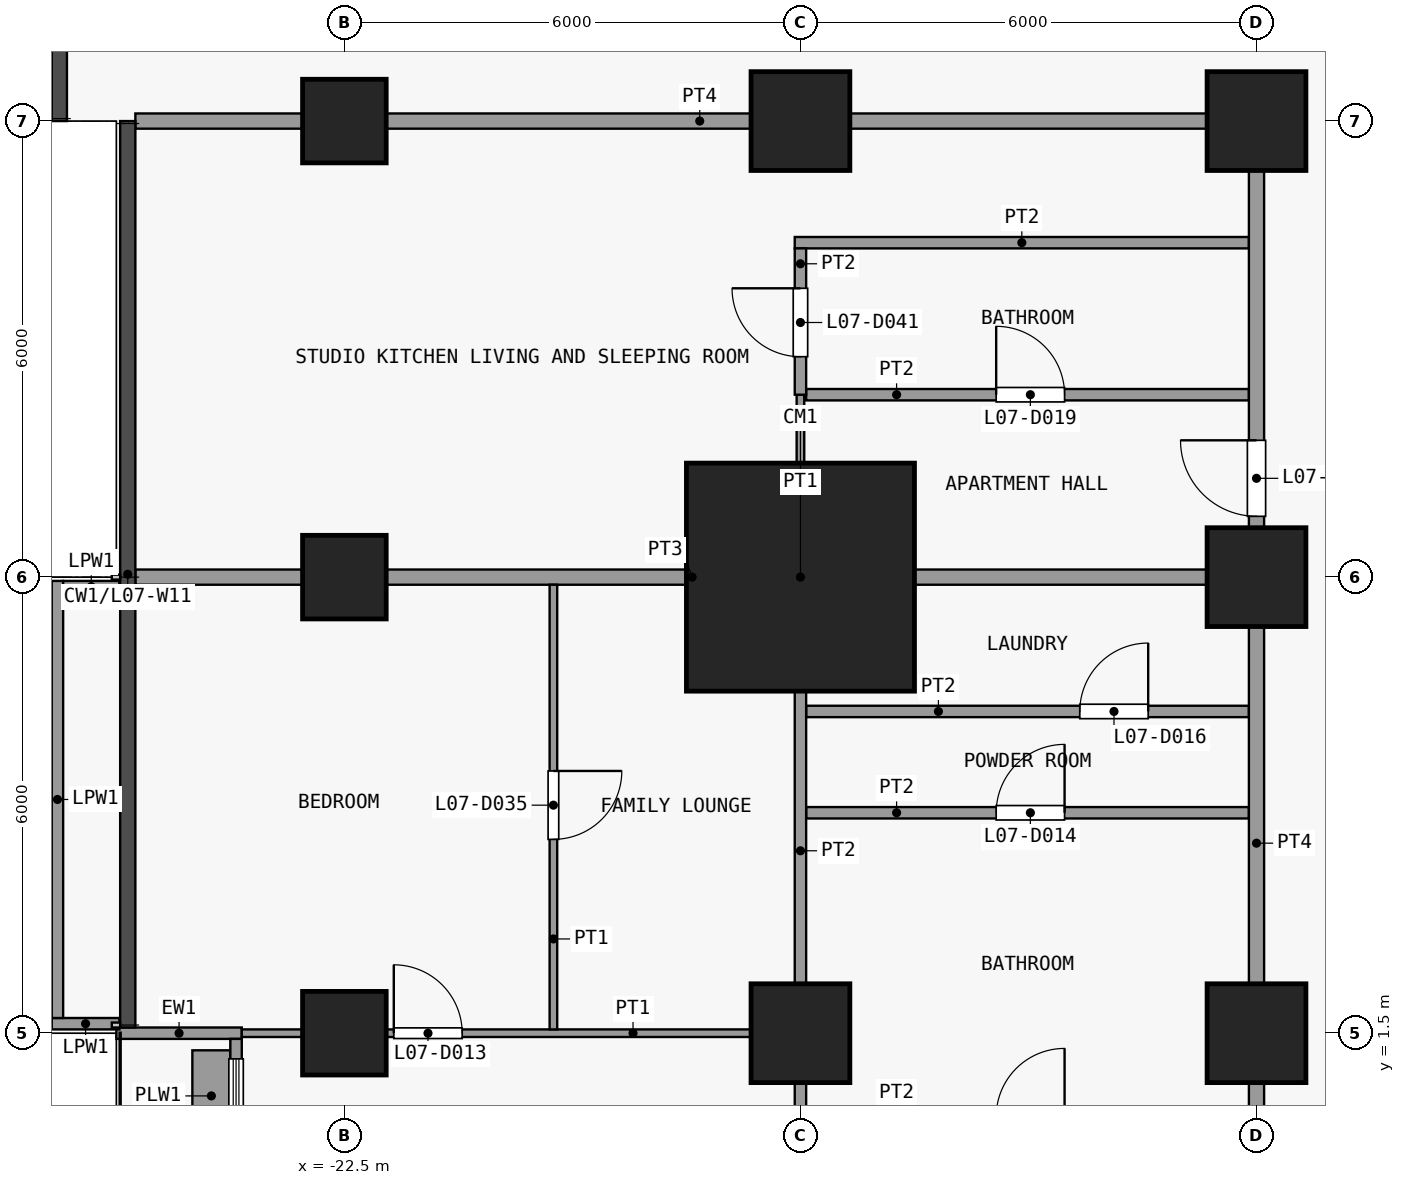
"""IFC4 building model, lengths in metres.
Left out: names, types, materials, properties, quantities, classifications, styles, units other than length and angle.
Written with IfcOpenShell. Run it as: python <this file> out.ifc"""

import sys

from ifc_helpers import new_model, si_unit, direction, frame, frame_2d, origin, origin_2d, place, context, subcontext, project, spatial, rectangle, extrude, element, fill, save


model = new_model("IFC4")
c1 = context("Model", 3, precision=1e-05, world=origin(), true_north=direction((0.0, 1.0)))
c2 = subcontext(c1, "Body", "Model", "MODEL_VIEW")
j1 = project(units=[si_unit("LENGTHUNIT", "METRE"), si_unit("PLANEANGLEUNIT", "RADIAN")], contexts=[c1])
p1 = place(None, origin())
s1 = spatial("IfcSite", under=j1, at=p1, CompositionType="ELEMENT")
p2 = place(p1, origin())
s2 = spatial("IfcBuilding", under=s1, at=p2, CompositionType="ELEMENT")
p3 = place(p2, frame((0.0, 0.0, 36.1)))
s3 = spatial("IfcBuildingStorey", under=s2, at=p3, CompositionType="ELEMENT", Elevation=36.1)
for number, where, z_axis, x_axis in (
    (1, (-22.5, 1.5, 0.0), (0.0, 0.0, 1.0), (1.0, 0.0, 0.0)),
    (2, (-22.5, 7.5, 0.0), (0.0, 0.0, 1.0), (1.0, 0.0, 0.0)),
    (3, (-22.5, 13.5, 0.0), (0.0, 0.0, 1.0), (1.0, 0.0, 0.0)),
):
    element("IfcColumn", number, at=place(p3, frame(where, z_axis=z_axis, x_axis=x_axis)), inside=s3, PredefinedType="COLUMN", context=c2, shape_type="SweptSolid", body=[
        extrude(rectangle(XDim=1.1, YDim=1.1, at=origin_2d()), origin(), (0.0, 0.0, 1.0), 3.6),
    ])
p4 = place(p3, frame((-16.5, 1.5, 0.0), z_axis=(0.0, 0.0, 1.0), x_axis=(1.0, 0.0, 0.0)))
e4 = element("IfcColumn", 4, at=p4, inside=s3, PredefinedType="COLUMN", context=c2, shape_type="SweptSolid", body=[
    extrude(rectangle(XDim=1.3, YDim=1.3, at=origin_2d()), origin(), (0.0, 0.0, 1.0), 3.6),
])
p5 = place(p3, frame((-16.5, 7.5, 0.0), z_axis=(0.0, 0.0, 1.0), x_axis=(1.0, 0.0, 0.0)))
e5 = element("IfcColumn", 5, at=p5, inside=s3, PredefinedType="COLUMN", context=c2, shape_type="SweptSolid", body=[
    extrude(rectangle(XDim=3.0, YDim=3.0, at=origin_2d()), origin(), (0.0, 0.0, 1.0), 3.6),
])
for number, where, z_axis, x_axis in (
    (6, (-16.5, 13.5, 0.0), (0.0, 0.0, 1.0), (1.0, 0.0, 0.0)),
    (7, (-10.5, 1.5, 0.0), (0.0, 0.0, 1.0), (1.0, 0.0, 0.0)),
    (8, (-10.5, 7.5, 0.0), (0.0, 0.0, 1.0), (1.0, 0.0, 0.0)),
    (9, (-10.5, 13.5, 0.0), (0.0, 0.0, 1.0), (1.0, 0.0, 0.0)),
):
    element("IfcColumn", number, at=place(p3, frame(where, z_axis=z_axis, x_axis=x_axis)), inside=s3, PredefinedType="COLUMN", context=c2, shape_type="SweptSolid", body=[
        extrude(rectangle(XDim=1.3, YDim=1.3, at=origin_2d()), origin(), (0.0, 0.0, 1.0), 3.6),
    ])
p6 = place(p3, frame((-23.85, 1.5, 0.0), z_axis=(0.0, 0.0, 1.0), x_axis=(-1.0, 0.0, 0.0)))
e10 = element("IfcWall", 10, at=p6, inside=s3, PredefinedType="SOLIDWALL", context=c2, shape_type="SweptSolid", body=[
    extrude(rectangle(XDim=1.65, YDim=0.15, at=frame_2d((0.825, 0.0))), origin(), (0.0, 0.0, 1.0), 3.3),
])
p7 = place(p3, frame((-23.925, -4.425, 0.0), z_axis=(0.0, 0.0, 1.0), x_axis=(0.0, 1.0, 0.0)))
e11 = element("IfcWall", 11, at=p7, inside=s3, PredefinedType="SOLIDWALL", context=c2, shape_type="SweptSolid", body=[
    extrude(rectangle(XDim=5.85, YDim=0.15, at=frame_2d((2.925, 0.0))), origin(), (0.0, 0.0, 1.0), 3.3),
])
p8 = place(p7, frame((2.325, 0.0, 0.0)))
e12 = element("IfcOpeningElement", 12, at=p8, cuts=e11, PredefinedType="OPENING", context=c2, shape_type="SweptSolid", body=[
    extrude(rectangle(XDim=1.2, YDim=2.4, at=frame_2d((0.6, 1.2))), frame((0.0, 0.085, 0.0), z_axis=(0.0, -1.0, 0.0), x_axis=(1.0, 0.0, 0.0)), (0.0, 0.0, 1.0), 0.17),
])
p9 = place(p7, frame((0.262, 0.0, 0.9)))
e13 = element("IfcOpeningElement", 13, at=p9, cuts=e11, PredefinedType="OPENING", context=c2, shape_type="SweptSolid", body=[
    extrude(rectangle(XDim=1.8, YDim=2.1, at=frame_2d((0.9, 1.05))), frame((0.0, 0.085, 0.0), z_axis=(0.0, -1.0, 0.0), x_axis=(1.0, 0.0, 0.0)), (0.0, 0.0, 1.0), 0.17),
])
p10 = place(p7, frame((3.788, 0.0, 0.9)))
e14 = element("IfcOpeningElement", 14, at=p10, cuts=e11, PredefinedType="OPENING", context=c2, shape_type="SweptSolid", body=[
    extrude(rectangle(XDim=1.8, YDim=2.1, at=frame_2d((0.9, 1.05))), frame((0.0, 0.085, 0.0), z_axis=(0.0, -1.0, 0.0), x_axis=(1.0, 0.0, 0.0)), (0.0, 0.0, 1.0), 0.17),
])
p11 = place(p3, frame((-24.25, 0.075, 0.0), z_axis=(0.0, 0.0, 1.0), x_axis=(0.0, 1.0, 0.0)))
e15 = element("IfcWall", 15, at=p11, inside=s3, PredefinedType="USERDEFINED", context=c2, shape_type="SweptSolid", body=[
    extrude(rectangle(XDim=1.2, YDim=0.5, at=frame_2d((0.6, 0.0))), origin(), (0.0, 0.0, 1.0), 0.9),
])
p12 = place(p3, frame((-25.46, 1.625, 0.0), z_axis=(0.0, 0.0, 1.0), x_axis=(-1.0, 0.0, 0.0)))
e16 = element("IfcWall", 16, at=p12, inside=s3, PredefinedType="PARAPET", context=c2, shape_type="SweptSolid", body=[
    extrude(rectangle(XDim=0.89, YDim=0.15, at=frame_2d((0.445, 0.0))), origin(), (0.0, 0.0, 1.0), 1.15),
])
p13 = place(p3, frame((-26.275, 1.7, 0.0), z_axis=(0.0, 0.0, 1.0), x_axis=(0.0, 1.0, 0.0)))
e17 = element("IfcWall", 17, at=p13, inside=s3, PredefinedType="PARAPET", context=c2, shape_type="SweptSolid", body=[
    extrude(rectangle(XDim=5.75, YDim=0.15, at=frame_2d((2.875, 0.0))), origin(), (0.0, 0.0, 1.0), 1.15),
])
p14 = place(p3, frame((-26.2, 7.375, 0.0), z_axis=(0.0, 0.0, 1.0), x_axis=(1.0, 0.0, 0.0)))
e18 = element("IfcWall", 18, at=p14, inside=s3, PredefinedType="PARAPET", context=c2, shape_type="SweptSolid", body=[
    extrude(rectangle(XDim=0.74, YDim=0.15, at=frame_2d((0.37, 0.0))), origin(), (0.0, 0.0, 1.0), 1.15),
])
p15 = place(p3, frame((-23.85, 1.5, 0.0), z_axis=(0.0, 0.0, 1.0), x_axis=(1.0, 0.0, 0.0)))
e19 = element("IfcWall", 19, at=p15, inside=s3, PredefinedType="PARTITIONING", context=c2, shape_type="SweptSolid", body=[
    extrude(rectangle(XDim=7.275, YDim=0.1, at=frame_2d((3.638, 0.0))), origin(), (0.0, 0.0, 1.0), 3.3),
])
p16 = place(p15, frame((2.0, 0.0, 0.0)))
e20 = element("IfcOpeningElement", 20, at=p16, cuts=e19, PredefinedType="OPENING", context=c2, shape_type="SweptSolid", body=[
    extrude(rectangle(XDim=0.9, YDim=2.1, at=frame_2d((0.45, 1.05))), frame((0.0, 0.06, 0.0), z_axis=(0.0, -1.0, 0.0), x_axis=(1.0, 0.0, 0.0)), (0.0, 0.0, 1.0), 0.12),
])
p17 = place(p3, frame((-16.425, 4.4, 0.0), z_axis=(0.0, 0.0, 1.0), x_axis=(1.0, 0.0, 0.0)))
e21 = element("IfcWall", 21, at=p17, inside=s3, PredefinedType="PARTITIONING", context=c2, shape_type="SweptSolid", body=[
    extrude(rectangle(XDim=5.825, YDim=0.15, at=frame_2d((2.913, 0.0))), origin(), (0.0, 0.0, 1.0), 3.3),
])
p18 = place(p17, frame((2.5, 0.0, 0.0)))
e22 = element("IfcOpeningElement", 22, at=p18, cuts=e21, PredefinedType="OPENING", context=c2, shape_type="SweptSolid", body=[
    extrude(rectangle(XDim=0.9, YDim=2.1, at=frame_2d((0.45, 1.05))), frame((0.0, 0.085, 0.0), z_axis=(0.0, -1.0, 0.0), x_axis=(1.0, 0.0, 0.0)), (0.0, 0.0, 1.0), 0.17),
])
p19 = place(p3, frame((-16.425, 5.733, 0.0), z_axis=(0.0, 0.0, 1.0), x_axis=(1.0, 0.0, 0.0)))
e23 = element("IfcWall", 23, at=p19, inside=s3, PredefinedType="PARTITIONING", context=c2, shape_type="SweptSolid", body=[
    extrude(rectangle(XDim=5.825, YDim=0.15, at=frame_2d((2.913, 0.0))), origin(), (0.0, 0.0, 1.0), 3.3),
])
p20 = place(p19, frame((3.6, 0.0, 0.0)))
e24 = element("IfcOpeningElement", 24, at=p20, cuts=e23, PredefinedType="OPENING", context=c2, shape_type="SweptSolid", body=[
    extrude(rectangle(XDim=0.9, YDim=2.1, at=frame_2d((0.45, 1.05))), frame((0.0, 0.085, 0.0), z_axis=(0.0, -1.0, 0.0), x_axis=(1.0, 0.0, 0.0)), (0.0, 0.0, 1.0), 0.17),
])
p21 = place(p3, frame((-25.25, 7.5, 0.0), z_axis=(0.0, 0.0, 1.0), x_axis=(1.0, 0.0, 0.0)))
e25 = element("IfcWall", 25, at=p21, inside=s3, PredefinedType="PARTITIONING", context=c2, shape_type="SweptSolid", body=[
    extrude(rectangle(XDim=14.65, YDim=0.2, at=frame_2d((7.325, 0.0))), origin(), (0.0, 0.0, 1.0), 3.3),
])
p22 = place(p3, frame((-16.425, 9.9, 0.0), z_axis=(0.0, 0.0, 1.0), x_axis=(1.0, 0.0, 0.0)))
e26 = element("IfcWall", 26, at=p22, inside=s3, PredefinedType="PARTITIONING", context=c2, shape_type="SweptSolid", body=[
    extrude(rectangle(XDim=5.825, YDim=0.15, at=frame_2d((2.913, 0.0))), origin(), (0.0, 0.0, 1.0), 3.3),
])
p23 = place(p22, frame((2.5, 0.0, 0.0)))
e27 = element("IfcOpeningElement", 27, at=p23, cuts=e26, PredefinedType="OPENING", context=c2, shape_type="SweptSolid", body=[
    extrude(rectangle(XDim=0.9, YDim=2.1, at=frame_2d((0.45, 1.05))), frame((0.0, 0.085, 0.0), z_axis=(0.0, -1.0, 0.0), x_axis=(1.0, 0.0, 0.0)), (0.0, 0.0, 1.0), 0.17),
])
p24 = place(p3, frame((-16.575, 11.9, 0.0), z_axis=(0.0, 0.0, 1.0), x_axis=(1.0, 0.0, 0.0)))
e28 = element("IfcWall", 28, at=p24, inside=s3, PredefinedType="PARTITIONING", context=c2, shape_type="SweptSolid", body=[
    extrude(rectangle(XDim=5.975, YDim=0.15, at=frame_2d((2.987, 0.0))), origin(), (0.0, 0.0, 1.0), 3.3),
])
p25 = place(p3, frame((-25.25, 13.5, 0.0), z_axis=(0.0, 0.0, 1.0), x_axis=(1.0, 0.0, 0.0)))
e29 = element("IfcWall", 29, at=p25, inside=s3, PredefinedType="PARTITIONING", context=c2, shape_type="SweptSolid", body=[
    extrude(rectangle(XDim=14.85, YDim=0.2, at=frame_2d((7.425, 0.0))), origin(), (0.0, 0.0, 1.0), 3.3),
])
p26 = place(p3, frame((-19.75, 1.55, 0.0), z_axis=(0.0, 0.0, 1.0), x_axis=(0.0, 1.0, 0.0)))
e30 = element("IfcWall", 30, at=p26, inside=s3, PredefinedType="PARTITIONING", context=c2, shape_type="SweptSolid", body=[
    extrude(rectangle(XDim=5.85, YDim=0.1, at=frame_2d((2.925, 0.0))), origin(), (0.0, 0.0, 1.0), 3.3),
])
p27 = place(p26, frame((2.5, 0.0, 0.0)))
e31 = element("IfcOpeningElement", 31, at=p27, cuts=e30, PredefinedType="OPENING", context=c2, shape_type="SweptSolid", body=[
    extrude(rectangle(XDim=0.9, YDim=2.1, at=frame_2d((0.45, 1.05))), frame((0.0, 0.06, 0.0), z_axis=(0.0, -1.0, 0.0), x_axis=(1.0, 0.0, 0.0)), (0.0, 0.0, 1.0), 0.12),
])
p28 = place(p3, frame((-16.5, 7.6, 0.0), z_axis=(0.0, 0.0, 1.0), x_axis=(0.0, 1.0, 0.0)))
e32 = element("IfcWall", 32, at=p28, inside=s3, PredefinedType="PARTITIONING", context=c2, shape_type="SweptSolid", body=[
    extrude(rectangle(XDim=2.3, YDim=0.1, at=frame_2d((1.15, 0.0))), origin(), (0.0, 0.0, 1.0), 3.3),
])
p29 = place(p3, frame((-16.5, 0.4, 0.0), z_axis=(0.0, 0.0, 1.0), x_axis=(0.0, 1.0, 0.0)))
e33 = element("IfcWall", 33, at=p29, inside=s3, PredefinedType="PARTITIONING", context=c2, shape_type="SweptSolid", body=[
    extrude(rectangle(XDim=7.0, YDim=0.15, at=frame_2d((3.5, 0.0))), origin(), (0.0, 0.0, 1.0), 3.3),
])
p30 = place(p3, frame((-16.5, 9.9, 0.0), z_axis=(0.0, 0.0, 1.0), x_axis=(0.0, 1.0, 0.0)))
e34 = element("IfcWall", 34, at=p30, inside=s3, PredefinedType="PARTITIONING", context=c2, shape_type="SweptSolid", body=[
    extrude(rectangle(XDim=1.925, YDim=0.15, at=frame_2d((0.962, 0.0))), origin(), (0.0, 0.0, 1.0), 3.3),
])
p31 = place(p30, frame((0.5, 0.0, 0.0)))
e35 = element("IfcOpeningElement", 35, at=p31, cuts=e34, PredefinedType="OPENING", context=c2, shape_type="SweptSolid", body=[
    extrude(rectangle(XDim=0.9, YDim=2.1, at=frame_2d((0.45, 1.05))), frame((0.0, 0.085, 0.0), z_axis=(0.0, -1.0, 0.0), x_axis=(1.0, 0.0, 0.0)), (0.0, 0.0, 1.0), 0.17),
])
p32 = place(p3, frame((-10.5, -4.4, 0.0), z_axis=(0.0, 0.0, 1.0), x_axis=(0.0, 1.0, 0.0)))
e36 = element("IfcWall", 36, at=p32, inside=s3, PredefinedType="PARTITIONING", context=c2, shape_type="SweptSolid", body=[
    extrude(rectangle(XDim=17.8, YDim=0.2, at=frame_2d((8.9, 0.0))), origin(), (0.0, 0.0, 1.0), 3.3),
])
p33 = place(p32, frame((3.1, 0.0, 0.0)))
e37 = element("IfcOpeningElement", 37, at=p33, cuts=e36, PredefinedType="OPENING", context=c2, shape_type="SweptSolid", body=[
    extrude(rectangle(XDim=1.0, YDim=2.1, at=frame_2d((0.5, 1.05))), frame((0.0, 0.11, 0.0), z_axis=(0.0, -1.0, 0.0), x_axis=(1.0, 0.0, 0.0)), (0.0, 0.0, 1.0), 0.22),
])
p34 = place(p32, frame((12.7, 0.0, 0.0)))
e38 = element("IfcOpeningElement", 38, at=p34, cuts=e36, PredefinedType="OPENING", context=c2, shape_type="SweptSolid", body=[
    extrude(rectangle(XDim=1.0, YDim=2.1, at=frame_2d((0.5, 1.05))), frame((0.0, 0.11, 0.0), z_axis=(0.0, -1.0, 0.0), x_axis=(1.0, 0.0, 0.0)), (0.0, 0.0, 1.0), 0.22),
])
p35 = place(p10, origin())
e39 = element("IfcWindow", 39, at=p35, inside=s3, PartitioningType="SINGLE_PANEL", PredefinedType="WINDOW", context=c2, shape_type="SweptSolid", body=[
    extrude(rectangle(XDim=1.8, YDim=2.1, at=frame_2d((0.9, 1.05))), frame((0.0, 0.03, 0.0), z_axis=(0.0, -1.0, 0.0), x_axis=(1.0, 0.0, 0.0)), (0.0, 0.0, 1.0), 0.06),
])
fill(e14, e39)
p36 = place(p16, origin())
e40 = element("IfcDoor", 40, at=p36, inside=s3, OperationType="SINGLE_SWING_RIGHT", PredefinedType="DOOR", context=c2, shape_type="SweptSolid", body=[
    extrude(rectangle(XDim=0.9, YDim=2.1, at=frame_2d((0.45, 1.05))), frame((0.0, 0.025, 0.0), z_axis=(0.0, -1.0, 0.0), x_axis=(1.0, 0.0, 0.0)), (0.0, 0.0, 1.0), 0.05),
])
fill(e20, e40)
p37 = place(p18, origin())
e41 = element("IfcDoor", 41, at=p37, inside=s3, OperationType="SINGLE_SWING_LEFT", PredefinedType="DOOR", context=c2, shape_type="SweptSolid", body=[
    extrude(rectangle(XDim=0.9, YDim=2.1, at=frame_2d((0.45, 1.05))), frame((0.0, 0.025, 0.0), z_axis=(0.0, -1.0, 0.0), x_axis=(1.0, 0.0, 0.0)), (0.0, 0.0, 1.0), 0.05),
])
fill(e22, e41)
p38 = place(p20, origin())
e42 = element("IfcDoor", 42, at=p38, inside=s3, OperationType="SINGLE_SWING_LEFT", PredefinedType="DOOR", context=c2, shape_type="SweptSolid", body=[
    extrude(rectangle(XDim=0.9, YDim=2.1, at=frame_2d((0.45, 1.05))), frame((0.0, 0.025, 0.0), z_axis=(0.0, -1.0, 0.0), x_axis=(1.0, 0.0, 0.0)), (0.0, 0.0, 1.0), 0.05),
])
fill(e24, e42)
p39 = place(p23, origin())
e43 = element("IfcDoor", 43, at=p39, inside=s3, OperationType="SINGLE_SWING_RIGHT", PredefinedType="DOOR", context=c2, shape_type="SweptSolid", body=[
    extrude(rectangle(XDim=0.9, YDim=2.1, at=frame_2d((0.45, 1.05))), frame((0.0, 0.025, 0.0), z_axis=(0.0, -1.0, 0.0), x_axis=(1.0, 0.0, 0.0)), (0.0, 0.0, 1.0), 0.05),
])
fill(e27, e43)
p40 = place(p27, origin())
e44 = element("IfcDoor", 44, at=p40, inside=s3, OperationType="SINGLE_SWING_RIGHT", PredefinedType="DOOR", context=c2, shape_type="SweptSolid", body=[
    extrude(rectangle(XDim=0.9, YDim=2.1, at=frame_2d((0.45, 1.05))), frame((0.0, 0.025, 0.0), z_axis=(0.0, -1.0, 0.0), x_axis=(1.0, 0.0, 0.0)), (0.0, 0.0, 1.0), 0.05),
])
fill(e31, e44)
p41 = place(p31, origin())
e45 = element("IfcDoor", 45, at=p41, inside=s3, OperationType="SINGLE_SWING_LEFT", PredefinedType="DOOR", context=c2, shape_type="SweptSolid", body=[
    extrude(rectangle(XDim=0.9, YDim=2.1, at=frame_2d((0.45, 1.05))), frame((0.0, 0.025, 0.0), z_axis=(0.0, -1.0, 0.0), x_axis=(1.0, 0.0, 0.0)), (0.0, 0.0, 1.0), 0.05),
])
fill(e35, e45)
p42 = place(p34, origin())
e46 = element("IfcDoor", 46, at=p42, inside=s3, OperationType="SINGLE_SWING_LEFT", PredefinedType="DOOR", context=c2, shape_type="SweptSolid", body=[
    extrude(rectangle(XDim=1.0, YDim=2.1, at=frame_2d((0.5, 1.05))), frame((0.0, 0.025, 0.0), z_axis=(0.0, -1.0, 0.0), x_axis=(1.0, 0.0, 0.0)), (0.0, 0.0, 1.0), 0.05),
])
fill(e38, e46)
save(model, sys.argv[1])
